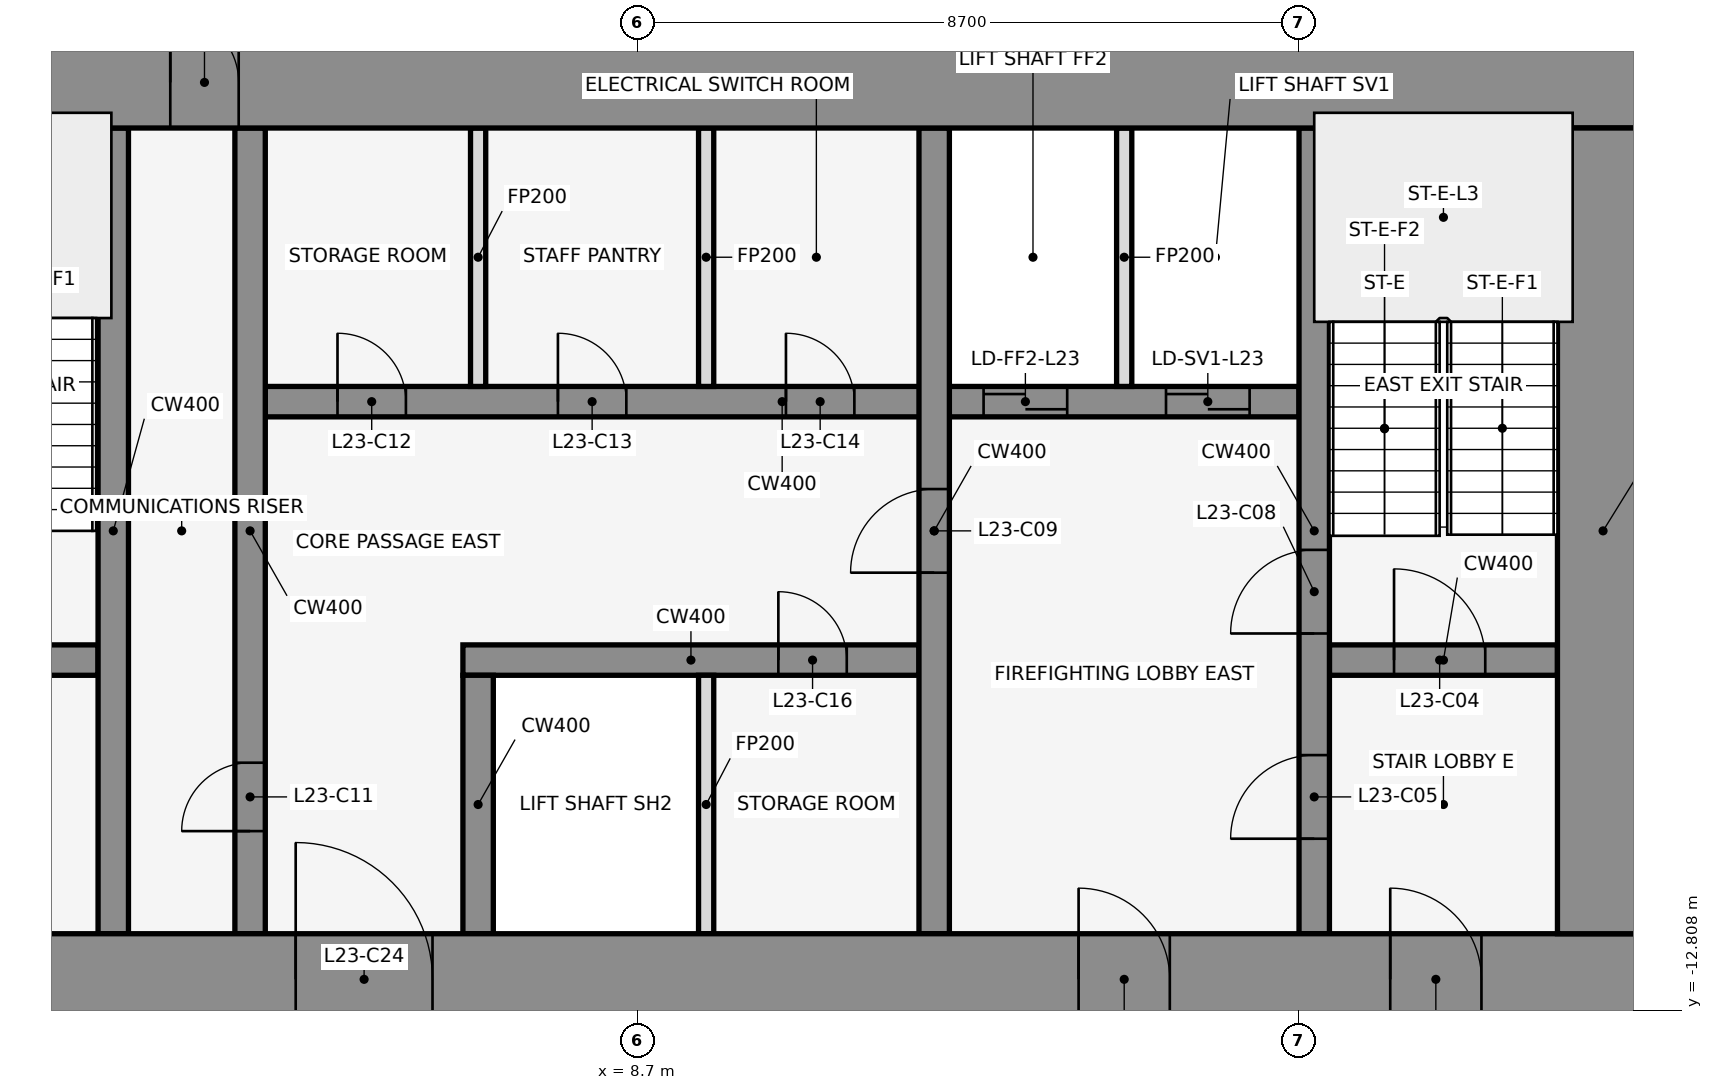
"""IFC4 building model, lengths in metres.
Left out: names, types, materials, properties, quantities, classifications, styles, units other than length and angle.
Written with IfcOpenShell. Run it as: python <this file> out.ifc"""

import sys

from ifc_helpers import new_model, si_unit, direction, frame, frame_2d, origin, place, context, subcontext, project, spatial, rectangle, extrude, element, fill, save


model = new_model("IFC4")
c1 = context("Model", 3, precision=1e-05, world=origin(), true_north=direction((0.0, 1.0)))
c2 = subcontext(c1, "Body", "Model", "MODEL_VIEW")
j1 = project(units=[si_unit("LENGTHUNIT", "METRE"), si_unit("PLANEANGLEUNIT", "RADIAN")], contexts=[c1])
p1 = place(None, origin())
s1 = spatial("IfcSite", under=j1, at=p1, CompositionType="ELEMENT")
p2 = place(p1, origin())
s2 = spatial("IfcBuilding", under=s1, at=p2, CompositionType="ELEMENT")
p3 = place(p2, frame((0.0, 0.0, 110.4)))
s3 = spatial("IfcBuildingStorey", under=s2, at=p3, CompositionType="ELEMENT", Elevation=110.4)
for number, where, z_axis, x_axis in (
    (1, (16.432, -0.105, 0.0), (0.0, 0.0, 1.0), (-0.84, 0.543, 0.0)),
    (2, (1.901, 1.08, 0.0), (0.0, 0.0, 1.0), (-0.84, -0.543, 0.0)),
):
    element("IfcWall", number, at=place(p3, frame(where, z_axis=z_axis, x_axis=x_axis)), inside=s3, PredefinedType="STANDARD", context=c2, shape_type="SweptSolid", body=[
        extrude(rectangle(XDim=2.183, YDim=0.25, at=frame_2d((1.091, 0.0))), origin(), (0.0, 0.0, 1.0), 3.95),
    ])
p4 = place(p3, frame((-1.6, -8.2, 0.0), z_axis=(0.0, 0.0, 1.0), x_axis=(1.0, 0.0, 0.0)))
e3 = element("IfcWall", 3, at=p4, inside=s3, PredefinedType="SHEAR", context=c2, shape_type="SweptSolid", body=[
    extrude(rectangle(XDim=3.2, YDim=0.4, at=frame_2d((1.6, 0.0))), origin(), (0.0, 0.0, 1.0), 4.1),
])
p5 = place(p4, frame((1.05, 0.0, 0.0)))
e4 = element("IfcOpeningElement", 4, at=p5, cuts=e3, PredefinedType="OPENING", context=c2, shape_type="SweptSolid", body=[
    extrude(rectangle(XDim=1.2, YDim=2.1, at=frame_2d((0.6, 1.05))), frame((0.0, 0.212, 0.0), z_axis=(0.0, -1.0, 0.0), x_axis=(1.0, 0.0, 0.0)), (0.0, 0.0, 1.0), 0.424),
])
p6 = place(p3, frame((6.4, -8.2, 0.0), z_axis=(0.0, 0.0, 1.0), x_axis=(1.0, 0.0, 0.0)))
e5 = element("IfcWall", 5, at=p6, inside=s3, PredefinedType="SHEAR", context=c2, shape_type="SweptSolid", body=[
    extrude(rectangle(XDim=6.0, YDim=0.4, at=frame_2d((3.0, 0.0))), origin(), (0.0, 0.0, 1.0), 4.1),
])
p7 = place(p6, frame((4.15, 0.0, 0.0)))
e6 = element("IfcOpeningElement", 6, at=p7, cuts=e5, PredefinedType="OPENING", context=c2, shape_type="SweptSolid", body=[
    extrude(rectangle(XDim=0.9, YDim=2.1, at=frame_2d((0.45, 1.05))), frame((0.0, 0.212, 0.0), z_axis=(0.0, -1.0, 0.0), x_axis=(1.0, 0.0, 0.0)), (0.0, 0.0, 1.0), 0.424),
])
p8 = place(p3, frame((17.8, -8.2, 0.0), z_axis=(0.0, 0.0, 1.0), x_axis=(1.0, 0.0, 0.0)))
e7 = element("IfcWall", 7, at=p8, inside=s3, PredefinedType="SHEAR", context=c2, shape_type="SweptSolid", body=[
    extrude(rectangle(XDim=3.0, YDim=0.4, at=frame_2d((1.5, 0.0))), origin(), (0.0, 0.0, 1.0), 4.1),
])
p9 = place(p8, frame((0.85, 0.0, 0.0)))
e8 = element("IfcOpeningElement", 8, at=p9, cuts=e7, PredefinedType="OPENING", context=c2, shape_type="SweptSolid", body=[
    extrude(rectangle(XDim=1.2, YDim=2.1, at=frame_2d((0.6, 1.05))), frame((0.0, 0.212, 0.0), z_axis=(0.0, -1.0, 0.0), x_axis=(1.0, 0.0, 0.0)), (0.0, 0.0, 1.0), 0.424),
])
p10 = place(p3, frame((3.8, -4.8, 0.0), z_axis=(0.0, 0.0, 1.0), x_axis=(1.0, 0.0, 0.0)))
e9 = element("IfcWall", 9, at=p10, inside=s3, PredefinedType="SHEAR", context=c2, shape_type="SweptSolid", body=[
    extrude(rectangle(XDim=13.6, YDim=0.4, at=frame_2d((6.8, 0.0))), origin(), (0.0, 0.0, 1.0), 4.1),
])
p11 = place(p10, frame((9.45, 0.0, 0.0)))
e10 = element("IfcOpeningElement", 10, at=p11, cuts=e9, PredefinedType="OPENING", context=c2, shape_type="SweptSolid", body=[
    extrude(rectangle(XDim=1.1, YDim=2.1, at=frame_2d((0.55, 1.05))), frame((0.0, 0.212, 0.0), z_axis=(0.0, -1.0, 0.0), x_axis=(1.0, 0.0, 0.0)), (0.0, 0.0, 1.0), 0.424),
])
p12 = place(p10, frame((11.85, 0.0, 0.0)))
e11 = element("IfcOpeningElement", 11, at=p12, cuts=e9, PredefinedType="OPENING", context=c2, shape_type="SweptSolid", body=[
    extrude(rectangle(XDim=1.1, YDim=2.1, at=frame_2d((0.55, 1.05))), frame((0.0, 0.212, 0.0), z_axis=(0.0, -1.0, 0.0), x_axis=(1.0, 0.0, 0.0)), (0.0, 0.0, 1.0), 0.424),
])
p13 = place(p10, frame((0.95, 0.0, 0.0)))
e12 = element("IfcOpeningElement", 12, at=p13, cuts=e9, PredefinedType="OPENING", context=c2, shape_type="SweptSolid", body=[
    extrude(rectangle(XDim=0.9, YDim=2.1, at=frame_2d((0.45, 1.05))), frame((0.0, 0.212, 0.0), z_axis=(0.0, -1.0, 0.0), x_axis=(1.0, 0.0, 0.0)), (0.0, 0.0, 1.0), 0.424),
])
p14 = place(p10, frame((3.85, 0.0, 0.0)))
e13 = element("IfcOpeningElement", 13, at=p14, cuts=e9, PredefinedType="OPENING", context=c2, shape_type="SweptSolid", body=[
    extrude(rectangle(XDim=0.9, YDim=2.1, at=frame_2d((0.45, 1.05))), frame((0.0, 0.212, 0.0), z_axis=(0.0, -1.0, 0.0), x_axis=(1.0, 0.0, 0.0)), (0.0, 0.0, 1.0), 0.424),
])
p15 = place(p10, frame((6.85, 0.0, 0.0)))
e14 = element("IfcOpeningElement", 14, at=p15, cuts=e9, PredefinedType="OPENING", context=c2, shape_type="SweptSolid", body=[
    extrude(rectangle(XDim=0.9, YDim=2.1, at=frame_2d((0.45, 1.05))), frame((0.0, 0.212, 0.0), z_axis=(0.0, -1.0, 0.0), x_axis=(1.0, 0.0, 0.0)), (0.0, 0.0, 1.0), 0.424),
])
p16 = place(p3, frame((1.8, -11.8, 0.0), z_axis=(0.0, 0.0, 1.0), x_axis=(0.0, 1.0, 0.0)))
e15 = element("IfcWall", 15, at=p16, inside=s3, PredefinedType="SHEAR", context=c2, shape_type="SweptSolid", body=[
    extrude(rectangle(XDim=10.6, YDim=0.4, at=frame_2d((5.3, 0.0))), origin(), (0.0, 0.0, 1.0), 4.1),
])
p17 = place(p3, frame((3.6, -11.8, 0.0), z_axis=(0.0, 0.0, 1.0), x_axis=(0.0, 1.0, 0.0)))
e16 = element("IfcWall", 16, at=p17, inside=s3, PredefinedType="SHEAR", context=c2, shape_type="SweptSolid", body=[
    extrude(rectangle(XDim=10.6, YDim=0.4, at=frame_2d((5.3, 0.0))), origin(), (0.0, 0.0, 1.0), 4.1),
])
p18 = place(p17, frame((1.35, 0.0, 0.0)))
e17 = element("IfcOpeningElement", 17, at=p18, cuts=e16, PredefinedType="OPENING", context=c2, shape_type="SweptSolid", body=[
    extrude(rectangle(XDim=0.9, YDim=2.1, at=frame_2d((0.45, 1.05))), frame((0.0, 0.212, 0.0), z_axis=(0.0, -1.0, 0.0), x_axis=(1.0, 0.0, 0.0)), (0.0, 0.0, 1.0), 0.424),
])
p19 = place(p3, frame((6.6, -11.8, 0.0), z_axis=(0.0, 0.0, 1.0), x_axis=(0.0, 1.0, 0.0)))
e18 = element("IfcWall", 18, at=p19, inside=s3, PredefinedType="SHEAR", context=c2, shape_type="SweptSolid", body=[
    extrude(rectangle(XDim=3.4, YDim=0.4, at=frame_2d((1.7, 0.0))), origin(), (0.0, 0.0, 1.0), 4.1),
])
for number, where, z_axis, x_axis in (
    (19, (6.6, -4.6, 0.0), (0.0, 0.0, 1.0), (0.0, 1.0, 0.0)),
    (20, (9.6, -11.8, 0.0), (0.0, 0.0, 1.0), (0.0, 1.0, 0.0)),
    (21, (9.6, -4.6, 0.0), (0.0, 0.0, 1.0), (0.0, 1.0, 0.0)),
):
    element("IfcWall", number, at=place(p3, frame(where, z_axis=z_axis, x_axis=x_axis)), inside=s3, PredefinedType="PARTITIONING", context=c2, shape_type="SweptSolid", body=[
        extrude(rectangle(XDim=3.4, YDim=0.2, at=frame_2d((1.7, 0.0))), origin(), (0.0, 0.0, 1.0), 3.018),
    ])
p20 = place(p3, frame((12.6, -11.8, 0.0), z_axis=(0.0, 0.0, 1.0), x_axis=(0.0, 1.0, 0.0)))
e22 = element("IfcWall", 22, at=p20, inside=s3, PredefinedType="SHEAR", context=c2, shape_type="SweptSolid", body=[
    extrude(rectangle(XDim=10.6, YDim=0.4, at=frame_2d((5.3, 0.0))), origin(), (0.0, 0.0, 1.0), 4.1),
])
p21 = place(p20, frame((4.75, 0.0, 0.0)))
e23 = element("IfcOpeningElement", 23, at=p21, cuts=e22, PredefinedType="OPENING", context=c2, shape_type="SweptSolid", body=[
    extrude(rectangle(XDim=1.1, YDim=2.1, at=frame_2d((0.55, 1.05))), frame((0.0, 0.212, 0.0), z_axis=(0.0, -1.0, 0.0), x_axis=(1.0, 0.0, 0.0)), (0.0, 0.0, 1.0), 0.424),
])
p22 = place(p3, frame((15.1, -4.6, 0.0), z_axis=(0.0, 0.0, 1.0), x_axis=(0.0, 1.0, 0.0)))
e24 = element("IfcWall", 24, at=p22, inside=s3, PredefinedType="PARTITIONING", context=c2, shape_type="SweptSolid", body=[
    extrude(rectangle(XDim=3.4, YDim=0.2, at=frame_2d((1.7, 0.0))), origin(), (0.0, 0.0, 1.0), 3.018),
])
p23 = place(p3, frame((17.6, -11.8, 0.0), z_axis=(0.0, 0.0, 1.0), x_axis=(0.0, 1.0, 0.0)))
e25 = element("IfcWall", 25, at=p23, inside=s3, PredefinedType="SHEAR", context=c2, shape_type="SweptSolid", body=[
    extrude(rectangle(XDim=10.6, YDim=0.4, at=frame_2d((5.3, 0.0))), origin(), (0.0, 0.0, 1.0), 4.1),
])
p24 = place(p23, frame((1.25, 0.0, 0.0)))
e26 = element("IfcOpeningElement", 26, at=p24, cuts=e25, PredefinedType="OPENING", context=c2, shape_type="SweptSolid", body=[
    extrude(rectangle(XDim=1.1, YDim=2.1, at=frame_2d((0.55, 1.05))), frame((0.0, 0.212, 0.0), z_axis=(0.0, -1.0, 0.0), x_axis=(1.0, 0.0, 0.0)), (0.0, 0.0, 1.0), 0.424),
])
p25 = place(p23, frame((3.95, 0.0, 0.0)))
e27 = element("IfcOpeningElement", 27, at=p25, cuts=e25, PredefinedType="OPENING", context=c2, shape_type="SweptSolid", body=[
    extrude(rectangle(XDim=1.1, YDim=2.1, at=frame_2d((0.55, 1.05))), frame((0.0, 0.212, 0.0), z_axis=(0.0, -1.0, 0.0), x_axis=(1.0, 0.0, 0.0)), (0.0, 0.0, 1.0), 0.424),
])
p26 = place(p3, frame((-22.0, -0.6, 0.0), z_axis=(0.0, 0.0, 1.0), x_axis=(1.0, 0.0, 0.0)))
e28 = element("IfcWall", 28, at=p26, inside=s3, PredefinedType="SHEAR", context=c2, shape_type="SweptSolid", body=[
    extrude(rectangle(XDim=44.0, YDim=1.2, at=frame_2d((22.0, 0.0))), origin(), (0.0, 0.0, 1.0), 4.1),
])
p27 = place(p26, frame((18.55, 0.0, 0.0)))
e29 = element("IfcOpeningElement", 29, at=p27, cuts=e28, PredefinedType="OPENING", context=c2, shape_type="SweptSolid", body=[
    extrude(rectangle(XDim=0.9, YDim=2.1, at=frame_2d((0.45, 1.05))), frame((0.0, 0.612, 0.0), z_axis=(0.0, -1.0, 0.0), x_axis=(1.0, 0.0, 0.0)), (0.0, 0.0, 1.0), 1.224),
])
p28 = place(p26, frame((24.55, 0.0, 0.0)))
e30 = element("IfcOpeningElement", 30, at=p28, cuts=e28, PredefinedType="OPENING", context=c2, shape_type="SweptSolid", body=[
    extrude(rectangle(XDim=0.9, YDim=2.1, at=frame_2d((0.45, 1.05))), frame((0.0, 0.612, 0.0), z_axis=(0.0, -1.0, 0.0), x_axis=(1.0, 0.0, 0.0)), (0.0, 0.0, 1.0), 1.224),
])
p29 = place(p3, frame((-22.0, -12.4, 0.0), z_axis=(0.0, 0.0, 1.0), x_axis=(1.0, 0.0, 0.0)))
e31 = element("IfcWall", 31, at=p29, inside=s3, PredefinedType="SHEAR", context=c2, shape_type="SweptSolid", body=[
    extrude(rectangle(XDim=44.0, YDim=1.2, at=frame_2d((22.0, 0.0))), origin(), (0.0, 0.0, 1.0), 4.1),
])
p30 = place(p29, frame((2.2, 0.0, 0.0)))
e32 = element("IfcOpeningElement", 32, at=p30, cuts=e31, PredefinedType="OPENING", context=c2, shape_type="SweptSolid", body=[
    extrude(rectangle(XDim=1.2, YDim=2.1, at=frame_2d((0.6, 1.05))), frame((0.0, 0.612, 0.0), z_axis=(0.0, -1.0, 0.0), x_axis=(1.0, 0.0, 0.0)), (0.0, 0.0, 1.0), 1.224),
])
p31 = place(p29, frame((21.4, 0.0, 0.0)))
e33 = element("IfcOpeningElement", 33, at=p31, cuts=e31, PredefinedType="OPENING", context=c2, shape_type="SweptSolid", body=[
    extrude(rectangle(XDim=1.2, YDim=2.1, at=frame_2d((0.6, 1.05))), frame((0.0, 0.612, 0.0), z_axis=(0.0, -1.0, 0.0), x_axis=(1.0, 0.0, 0.0)), (0.0, 0.0, 1.0), 1.224),
])
p32 = place(p29, frame((40.6, 0.0, 0.0)))
e34 = element("IfcOpeningElement", 34, at=p32, cuts=e31, PredefinedType="OPENING", context=c2, shape_type="SweptSolid", body=[
    extrude(rectangle(XDim=1.2, YDim=2.1, at=frame_2d((0.6, 1.05))), frame((0.0, 0.612, 0.0), z_axis=(0.0, -1.0, 0.0), x_axis=(1.0, 0.0, 0.0)), (0.0, 0.0, 1.0), 1.224),
])
p33 = place(p29, frame((16.0, 0.0, 0.0)))
e35 = element("IfcOpeningElement", 35, at=p33, cuts=e31, PredefinedType="OPENING", context=c2, shape_type="SweptSolid", body=[
    extrude(rectangle(XDim=1.8, YDim=2.1, at=frame_2d((0.9, 1.05))), frame((0.0, 0.612, 0.0), z_axis=(0.0, -1.0, 0.0), x_axis=(1.0, 0.0, 0.0)), (0.0, 0.0, 1.0), 1.224),
])
p34 = place(p29, frame((6.3, 0.0, 0.0)))
e36 = element("IfcOpeningElement", 36, at=p34, cuts=e31, PredefinedType="OPENING", context=c2, shape_type="SweptSolid", body=[
    extrude(rectangle(XDim=1.2, YDim=2.1, at=frame_2d((0.6, 1.05))), frame((0.0, 0.612, 0.0), z_axis=(0.0, -1.0, 0.0), x_axis=(1.0, 0.0, 0.0)), (0.0, 0.0, 1.0), 1.224),
])
p35 = place(p29, frame((26.2, 0.0, 0.0)))
e37 = element("IfcOpeningElement", 37, at=p35, cuts=e31, PredefinedType="OPENING", context=c2, shape_type="SweptSolid", body=[
    extrude(rectangle(XDim=1.8, YDim=2.1, at=frame_2d((0.9, 1.05))), frame((0.0, 0.612, 0.0), z_axis=(0.0, -1.0, 0.0), x_axis=(1.0, 0.0, 0.0)), (0.0, 0.0, 1.0), 1.224),
])
p36 = place(p29, frame((36.5, 0.0, 0.0)))
e38 = element("IfcOpeningElement", 38, at=p36, cuts=e31, PredefinedType="OPENING", context=c2, shape_type="SweptSolid", body=[
    extrude(rectangle(XDim=1.2, YDim=2.1, at=frame_2d((0.6, 1.05))), frame((0.0, 0.612, 0.0), z_axis=(0.0, -1.0, 0.0), x_axis=(1.0, 0.0, 0.0)), (0.0, 0.0, 1.0), 1.224),
])
p37 = place(p3, frame((21.4, -11.8, 0.0), z_axis=(0.0, 0.0, 1.0), x_axis=(0.0, 1.0, 0.0)))
e39 = element("IfcWall", 39, at=p37, inside=s3, PredefinedType="SHEAR", context=c2, shape_type="SweptSolid", body=[
    extrude(rectangle(XDim=10.6, YDim=1.2, at=frame_2d((5.3, 0.0))), origin(), (0.0, 0.0, 1.0), 4.1),
])
p38 = place(p9, origin())
e40 = element("IfcDoor", 40, at=p38, inside=s3, OperationType="SINGLE_SWING_RIGHT", PredefinedType="DOOR", context=c2, shape_type="SweptSolid", body=[
    extrude(rectangle(XDim=1.2, YDim=2.1, at=frame_2d((0.6, 1.05))), frame((0.0, 0.025, 0.0), z_axis=(0.0, -1.0, 0.0), x_axis=(1.0, 0.0, 0.0)), (0.0, 0.0, 1.0), 0.05),
])
fill(e8, e40)
p39 = place(p24, origin())
e41 = element("IfcDoor", 41, at=p39, inside=s3, OperationType="SINGLE_SWING_LEFT", PredefinedType="DOOR", context=c2, shape_type="SweptSolid", body=[
    extrude(rectangle(XDim=1.1, YDim=2.1, at=frame_2d((0.55, 1.05))), frame((0.0, 0.025, 0.0), z_axis=(0.0, -1.0, 0.0), x_axis=(1.0, 0.0, 0.0)), (0.0, 0.0, 1.0), 0.05),
])
fill(e26, e41)
p40 = place(p11, origin())
e42 = element("IfcDoor", 42, at=p40, inside=s3, OperationType="DOUBLE_DOOR_SLIDING", PredefinedType="DOOR", context=c2, shape_type="SweptSolid", body=[
    extrude(rectangle(XDim=1.1, YDim=2.1, at=frame_2d((0.55, 1.05))), frame((0.0, 0.025, 0.0), z_axis=(0.0, -1.0, 0.0), x_axis=(1.0, 0.0, 0.0)), (0.0, 0.0, 1.0), 0.05),
])
fill(e10, e42)
p41 = place(p12, origin())
e43 = element("IfcDoor", 43, at=p41, inside=s3, OperationType="DOUBLE_DOOR_SLIDING", PredefinedType="DOOR", context=c2, shape_type="SweptSolid", body=[
    extrude(rectangle(XDim=1.1, YDim=2.1, at=frame_2d((0.55, 1.05))), frame((0.0, 0.025, 0.0), z_axis=(0.0, -1.0, 0.0), x_axis=(1.0, 0.0, 0.0)), (0.0, 0.0, 1.0), 0.05),
])
fill(e11, e43)
p42 = place(p25, origin())
e44 = element("IfcDoor", 44, at=p42, inside=s3, OperationType="SINGLE_SWING_RIGHT", PredefinedType="DOOR", context=c2, shape_type="SweptSolid", body=[
    extrude(rectangle(XDim=1.1, YDim=2.1, at=frame_2d((0.55, 1.05))), frame((0.0, 0.025, 0.0), z_axis=(0.0, -1.0, 0.0), x_axis=(1.0, 0.0, 0.0)), (0.0, 0.0, 1.0), 0.05),
])
fill(e27, e44)
p43 = place(p21, frame((1.1, 0.0, 0.0), z_axis=(0.0, 0.0, 1.0), x_axis=(-1.0, 0.0, 0.0)))
e45 = element("IfcDoor", 45, at=p43, inside=s3, OperationType="SINGLE_SWING_RIGHT", PredefinedType="DOOR", context=c2, shape_type="SweptSolid", body=[
    extrude(rectangle(XDim=1.1, YDim=2.1, at=frame_2d((0.55, 1.05))), frame((0.0, 0.025, 0.0), z_axis=(0.0, -1.0, 0.0), x_axis=(1.0, 0.0, 0.0)), (0.0, 0.0, 1.0), 0.05),
])
fill(e23, e45)
p44 = place(p18, origin())
e46 = element("IfcDoor", 46, at=p44, inside=s3, OperationType="SINGLE_SWING_LEFT", PredefinedType="DOOR", context=c2, shape_type="SweptSolid", body=[
    extrude(rectangle(XDim=0.9, YDim=2.1, at=frame_2d((0.45, 1.05))), frame((0.0, 0.025, 0.0), z_axis=(0.0, -1.0, 0.0), x_axis=(1.0, 0.0, 0.0)), (0.0, 0.0, 1.0), 0.05),
])
fill(e17, e46)
p45 = place(p13, origin())
e47 = element("IfcDoor", 47, at=p45, inside=s3, OperationType="SINGLE_SWING_RIGHT", PredefinedType="DOOR", context=c2, shape_type="SweptSolid", body=[
    extrude(rectangle(XDim=0.9, YDim=2.1, at=frame_2d((0.45, 1.05))), frame((0.0, 0.025, 0.0), z_axis=(0.0, -1.0, 0.0), x_axis=(1.0, 0.0, 0.0)), (0.0, 0.0, 1.0), 0.05),
])
fill(e12, e47)
p46 = place(p14, origin())
e48 = element("IfcDoor", 48, at=p46, inside=s3, OperationType="SINGLE_SWING_LEFT", PredefinedType="DOOR", context=c2, shape_type="SweptSolid", body=[
    extrude(rectangle(XDim=0.9, YDim=2.1, at=frame_2d((0.45, 1.05))), frame((0.0, 0.025, 0.0), z_axis=(0.0, -1.0, 0.0), x_axis=(1.0, 0.0, 0.0)), (0.0, 0.0, 1.0), 0.05),
])
fill(e13, e48)
p47 = place(p15, origin())
e49 = element("IfcDoor", 49, at=p47, inside=s3, OperationType="SINGLE_SWING_RIGHT", PredefinedType="DOOR", context=c2, shape_type="SweptSolid", body=[
    extrude(rectangle(XDim=0.9, YDim=2.1, at=frame_2d((0.45, 1.05))), frame((0.0, 0.025, 0.0), z_axis=(0.0, -1.0, 0.0), x_axis=(1.0, 0.0, 0.0)), (0.0, 0.0, 1.0), 0.05),
])
fill(e14, e49)
p48 = place(p7, frame((0.9, 0.0, 0.0), z_axis=(0.0, 0.0, 1.0), x_axis=(-1.0, 0.0, 0.0)))
e50 = element("IfcDoor", 50, at=p48, inside=s3, OperationType="SINGLE_SWING_LEFT", PredefinedType="DOOR", context=c2, shape_type="SweptSolid", body=[
    extrude(rectangle(XDim=0.9, YDim=2.1, at=frame_2d((0.45, 1.05))), frame((0.0, 0.025, 0.0), z_axis=(0.0, -1.0, 0.0), x_axis=(1.0, 0.0, 0.0)), (0.0, 0.0, 1.0), 0.05),
])
fill(e6, e50)
p49 = place(p28, origin())
e51 = element("IfcDoor", 51, at=p49, inside=s3, OperationType="SINGLE_SWING_LEFT", PredefinedType="DOOR", context=c2, shape_type="SweptSolid", body=[
    extrude(rectangle(XDim=0.9, YDim=2.1, at=frame_2d((0.45, 1.05))), frame((0.0, 0.025, 0.0), z_axis=(0.0, -1.0, 0.0), x_axis=(1.0, 0.0, 0.0)), (0.0, 0.0, 1.0), 0.05),
])
fill(e30, e51)
p50 = place(p32, frame((1.2, 0.0, 0.0), z_axis=(0.0, 0.0, 1.0), x_axis=(-1.0, 0.0, 0.0)))
e52 = element("IfcDoor", 52, at=p50, inside=s3, OperationType="SINGLE_SWING_RIGHT", PredefinedType="DOOR", context=c2, shape_type="SweptSolid", body=[
    extrude(rectangle(XDim=1.2, YDim=2.1, at=frame_2d((0.6, 1.05))), frame((0.0, 0.025, 0.0), z_axis=(0.0, -1.0, 0.0), x_axis=(1.0, 0.0, 0.0)), (0.0, 0.0, 1.0), 0.05),
])
fill(e34, e52)
p51 = place(p35, origin())
e53 = element("IfcDoor", 53, at=p51, inside=s3, OperationType="SINGLE_SWING_LEFT", PredefinedType="DOOR", context=c2, shape_type="SweptSolid", body=[
    extrude(rectangle(XDim=1.8, YDim=2.1, at=frame_2d((0.9, 1.05))), frame((0.0, 0.025, 0.0), z_axis=(0.0, -1.0, 0.0), x_axis=(1.0, 0.0, 0.0)), (0.0, 0.0, 1.0), 0.05),
])
fill(e37, e53)
p52 = place(p36, frame((1.2, 0.0, 0.0), z_axis=(0.0, 0.0, 1.0), x_axis=(-1.0, 0.0, 0.0)))
e54 = element("IfcDoor", 54, at=p52, inside=s3, OperationType="SINGLE_SWING_RIGHT", PredefinedType="DOOR", context=c2, shape_type="SweptSolid", body=[
    extrude(rectangle(XDim=1.2, YDim=2.1, at=frame_2d((0.6, 1.05))), frame((0.0, 0.025, 0.0), z_axis=(0.0, -1.0, 0.0), x_axis=(1.0, 0.0, 0.0)), (0.0, 0.0, 1.0), 0.05),
])
fill(e38, e54)
save(model, sys.argv[1])
